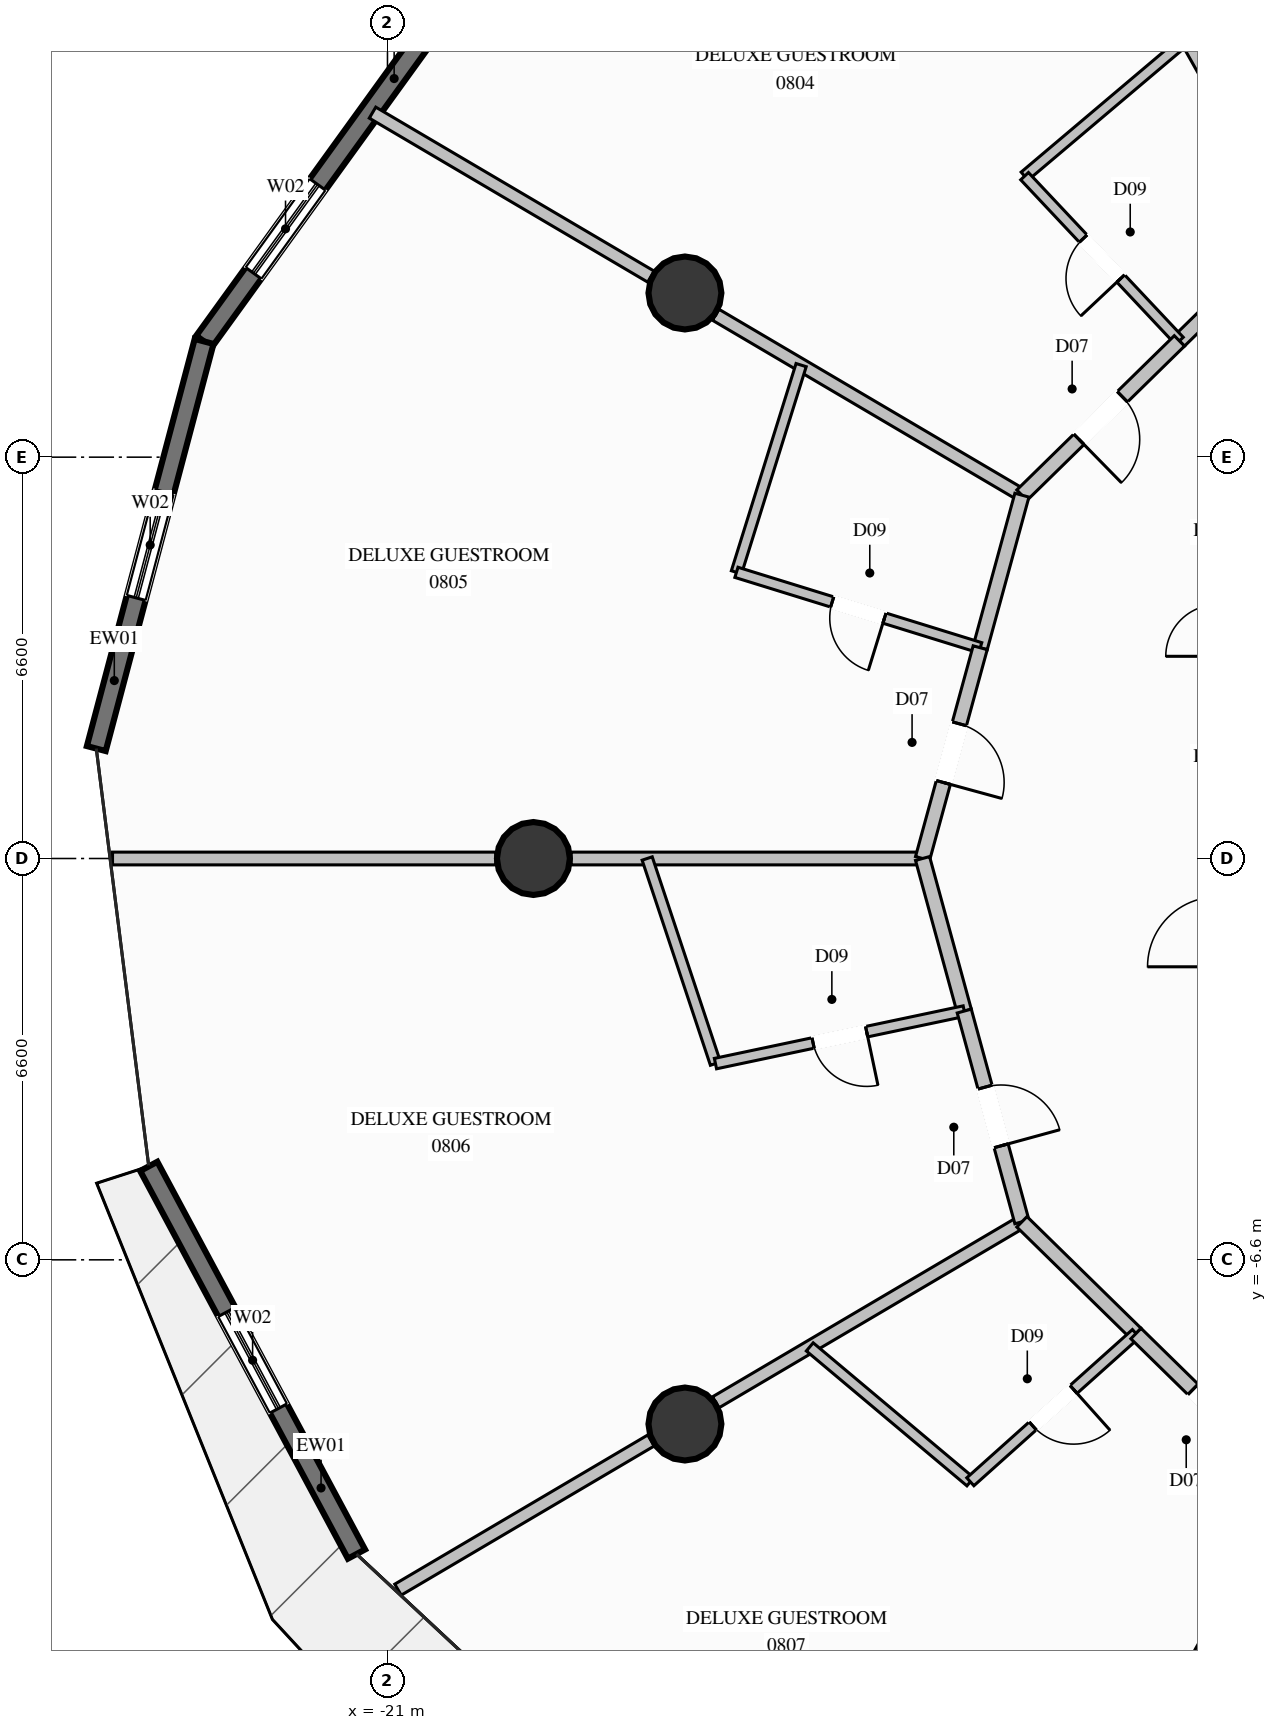
"""IFC4 building model, lengths in metres.
Left out: names, types, materials, properties, quantities, classifications, styles, units other than length and angle.
Written with IfcOpenShell. Run it as: python <this file> out.ifc"""

import sys

from ifc_helpers import new_model, si_unit, direction, frame, frame_2d, origin, origin_2d, place, context, subcontext, project, spatial, rectangle, circle, extrude, element, fill, save


model = new_model("IFC4")
c1 = context("Model", 3, precision=1e-05, world=origin(), true_north=direction((0.0, 1.0)))
c2 = subcontext(c1, "Body", "Model", "MODEL_VIEW")
j1 = project(units=[si_unit("LENGTHUNIT", "METRE"), si_unit("PLANEANGLEUNIT", "RADIAN")], contexts=[c1])
p1 = place(None, origin())
s1 = spatial("IfcSite", under=j1, at=p1, CompositionType="ELEMENT")
p2 = place(p1, origin())
s2 = spatial("IfcBuilding", under=s1, at=p2, CompositionType="ELEMENT")
p3 = place(p2, frame((0.0, 0.0, 32.0)))
s3 = spatial("IfcBuildingStorey", under=s2, at=p3, CompositionType="ELEMENT", Elevation=32.0)
for number, where, z_axis, x_axis in (
    (1, (-16.108, 9.3, 0.0), (0.0, 0.0, 1.0), (1.0, 0.0, 0.0)),
    (2, (-18.6, 0.0, 0.0), (0.0, 0.0, 1.0), (1.0, 0.0, 0.0)),
    (3, (-16.108, -9.3, 0.0), (0.0, 0.0, 1.0), (1.0, 0.0, 0.0)),
):
    element("IfcColumn", number, at=place(p3, frame(where, z_axis=z_axis, x_axis=x_axis)), inside=s3, PredefinedType="COLUMN", context=c2, shape_type="SweptSolid", body=[
        extrude(circle(Radius=0.6, at=origin_2d()), origin(), (0.0, 0.0, 1.0), 3.6),
    ])
p4 = place(p3, frame((-24.016, 8.503, 0.0), z_axis=(0.0, 0.0, 1.0), x_axis=(0.585883584877, 0.810395227634, 0.0)))
e4 = element("IfcWall", 4, at=p4, inside=s3, PredefinedType="SOLIDWALL", context=c2, shape_type="SweptSolid", body=[
    extrude(rectangle(XDim=7.234, YDim=0.32, at=frame_2d((3.617, 0.0))), origin(), (0.0, 0.0, 1.0), 3.34),
])
p5 = place(p4, frame((1.386, 0.0, 0.35)))
e5 = element("IfcOpeningElement", 5, at=p5, cuts=e4, PredefinedType="OPENING", context=c2, shape_type="SweptSolid", body=[
    extrude(rectangle(XDim=1.8, YDim=2.6, at=frame_2d((0.9, 1.3))), frame((0.0, 0.17, 0.0), z_axis=(0.0, -1.0, 0.0), x_axis=(1.0, 0.0, 0.0)), (0.0, 0.0, 1.0), 0.34),
])
p6 = place(p3, frame((-25.789, 1.808, 0.0), z_axis=(0.0, 0.0, 1.0), x_axis=(0.255999140835, 0.966677009084, 0.0)))
e6 = element("IfcWall", 6, at=p6, inside=s3, PredefinedType="SOLIDWALL", context=c2, shape_type="SweptSolid", body=[
    extrude(rectangle(XDim=6.926, YDim=0.32, at=frame_2d((3.463, 0.0))), origin(), (0.0, 0.0, 1.0), 3.34),
])
p7 = place(p6, frame((2.563, 0.0, 0.35)))
e7 = element("IfcOpeningElement", 7, at=p7, cuts=e6, PredefinedType="OPENING", context=c2, shape_type="SweptSolid", body=[
    extrude(rectangle(XDim=1.8, YDim=2.6, at=frame_2d((0.9, 1.3))), frame((0.0, 0.17, 0.0), z_axis=(0.0, -1.0, 0.0), x_axis=(1.0, 0.0, 0.0)), (0.0, 0.0, 1.0), 0.34),
])
p8 = place(p3, frame((-21.51, -11.439, 0.0), z_axis=(0.0, 0.0, 1.0), x_axis=(-0.472255130515, 0.881461905985, 0.0)))
e8 = element("IfcWall", 8, at=p8, inside=s3, PredefinedType="SOLIDWALL", context=c2, shape_type="SweptSolid", body=[
    extrude(rectangle(XDim=7.233, YDim=0.32, at=frame_2d((3.617, 0.0))), origin(), (0.0, 0.0, 1.0), 3.34),
])
p9 = place(p8, frame((2.717, 0.0, 0.35)))
e9 = element("IfcOpeningElement", 9, at=p9, cuts=e8, PredefinedType="OPENING", context=c2, shape_type="SweptSolid", body=[
    extrude(rectangle(XDim=1.8, YDim=2.6, at=frame_2d((0.9, 1.3))), frame((0.0, 0.17, 0.0), z_axis=(0.0, -1.0, 0.0), x_axis=(1.0, 0.0, 0.0)), (0.0, 0.0, 1.0), 0.34),
])
p10 = place(p3, frame((-6.1, 10.349, 0.0), z_axis=(0.0, 0.0, 1.0), x_axis=(-0.491140594116, 0.871080315936, 0.0)))
e10 = element("IfcWall", 10, at=p10, inside=s3, PredefinedType="PARTITIONING", context=c2, shape_type="SweptSolid", body=[
    extrude(rectangle(XDim=5.969, YDim=0.21, at=frame_2d((2.985, 0.0))), origin(), (0.0, 0.0, 1.0), 2.709),
])
p11 = place(p3, frame((-10.566, 5.975, 0.0), z_axis=(0.0, 0.0, 1.0), x_axis=(-0.86160761681, 0.507574935014, 0.0)))
e11 = element("IfcWall", 11, at=p11, inside=s3, PredefinedType="PARTITIONING", context=c2, shape_type="SweptSolid", body=[
    extrude(rectangle(XDim=5.845, YDim=0.21, at=frame_2d((2.922, 0.0))), origin(), (0.0, 0.0, 1.0), 2.709),
])
p12 = place(p3, frame((-16.667, 9.569, 0.0), z_axis=(0.0, 0.0, 1.0), x_axis=(-0.861651827739, 0.50749987956, 0.0)))
e12 = element("IfcWall", 12, at=p12, inside=s3, PredefinedType="PARTITIONING", context=c2, shape_type="SweptSolid", body=[
    extrude(rectangle(XDim=5.314, YDim=0.21, at=frame_2d((2.657, 0.0))), origin(), (0.0, 0.0, 1.0), 3.34),
])
p13 = place(p3, frame((-12.2, 0.0, 0.0), z_axis=(0.0, 0.0, 1.0), x_axis=(-1.0, 0.0, 0.0)))
e13 = element("IfcWall", 13, at=p13, inside=s3, PredefinedType="PARTITIONING", context=c2, shape_type="SweptSolid", body=[
    extrude(rectangle(XDim=5.78, YDim=0.21, at=frame_2d((2.89, 0.0))), origin(), (0.0, 0.0, 1.0), 2.709),
])
p14 = place(p3, frame((-19.22, 0.0, 0.0), z_axis=(0.0, 0.0, 1.0), x_axis=(-1.0, 0.0, 0.0)))
e14 = element("IfcWall", 14, at=p14, inside=s3, PredefinedType="PARTITIONING", context=c2, shape_type="SweptSolid", body=[
    extrude(rectangle(XDim=6.302, YDim=0.21, at=frame_2d((3.151, 0.0))), origin(), (0.0, 0.0, 1.0), 3.34),
])
p15 = place(p3, frame((-10.566, -5.975, 0.0), z_axis=(0.0, 0.0, 1.0), x_axis=(-0.861473203585, -0.507803032194, 0.0)))
e15 = element("IfcWall", 15, at=p15, inside=s3, PredefinedType="PARTITIONING", context=c2, shape_type="SweptSolid", body=[
    extrude(rectangle(XDim=5.845, YDim=0.21, at=frame_2d((2.922, 0.0))), origin(), (0.0, 0.0, 1.0), 2.709),
])
p16 = place(p3, frame((-16.666, -9.571, 0.0), z_axis=(0.0, 0.0, 1.0), x_axis=(-0.861454358035, -0.50783500177, 0.0)))
e16 = element("IfcWall", 16, at=p16, inside=s3, PredefinedType="PARTITIONING", context=c2, shape_type="SweptSolid", body=[
    extrude(rectangle(XDim=4.83, YDim=0.21, at=frame_2d((2.415, 0.0))), origin(), (0.0, 0.0, 1.0), 3.34),
])
p17 = place(p3, frame((-6.1, -10.349, 0.0), z_axis=(0.0, 0.0, 1.0), x_axis=(-0.490503945764, -0.871438970433, 0.0)))
e17 = element("IfcWall", 17, at=p17, inside=s3, PredefinedType="PARTITIONING", context=c2, shape_type="SweptSolid", body=[
    extrude(rectangle(XDim=5.969, YDim=0.21, at=frame_2d((2.985, 0.0))), origin(), (0.0, 0.0, 1.0), 2.709),
])
p18 = place(p3, frame((-6.1, 10.349, 0.0), z_axis=(0.0, 0.0, 1.0), x_axis=(-0.714460071513, -0.69967621527, 0.0)))
e18 = element("IfcWall", 18, at=p18, inside=s3, PredefinedType="PARTITIONING", context=c2, shape_type="SweptSolid", body=[
    extrude(rectangle(XDim=2.626, YDim=0.24, at=frame_2d((1.313, 0.0))), origin(), (0.0, 0.0, 1.0), 3.34),
])
p19 = place(p3, frame((-7.86, 13.471, 0.0), z_axis=(0.0, 0.0, 1.0), x_axis=(-0.763718302061, -0.645549653471, 0.0)))
e19 = element("IfcWall", 19, at=p19, inside=s3, PredefinedType="PLUMBINGWALL", context=c2, shape_type="SweptSolid", body=[
    extrude(rectangle(XDim=3.485, YDim=0.175, at=frame_2d((1.743, 0.0))), origin(), (0.0, 0.0, 1.0), 3.34),
])
p20 = place(p3, frame((-7.976, 8.512, 0.0), z_axis=(0.0, 0.0, 1.0), x_axis=(-0.684831906404, 0.72870107724, 0.0)))
e20 = element("IfcWall", 20, at=p20, inside=s3, PredefinedType="PLUMBINGWALL", context=c2, shape_type="SweptSolid", body=[
    extrude(rectangle(XDim=3.718, YDim=0.175, at=frame_2d((1.859, 0.0))), origin(), (0.0, 0.0, 1.0), 3.34),
])
p21 = place(p20, frame((1.409, 0.0, 0.0)))
e21 = element("IfcOpeningElement", 21, at=p21, cuts=e20, PredefinedType="OPENING", context=c2, shape_type="SweptSolid", body=[
    extrude(rectangle(XDim=0.9, YDim=2.1, at=frame_2d((0.45, 1.05))), frame((0.0, 0.098, 0.0), z_axis=(0.0, -1.0, 0.0), x_axis=(1.0, 0.0, 0.0)), (0.0, 0.0, 1.0), 0.195),
])
p22 = place(p3, frame((-7.976, 8.512, 0.0), z_axis=(0.0, 0.0, 1.0), x_axis=(-0.714375756875, -0.699762301064, 0.0)))
e22 = element("IfcWall", 22, at=p22, inside=s3, PredefinedType="PARTITIONING", context=c2, shape_type="SweptSolid", body=[
    extrude(rectangle(XDim=3.625, YDim=0.24, at=frame_2d((1.812, 0.0))), origin(), (0.0, 0.0, 1.0), 3.34),
])
p23 = place(p22, frame((1.313, 0.0, 0.0)))
e23 = element("IfcOpeningElement", 23, at=p23, cuts=e22, PredefinedType="OPENING", context=c2, shape_type="SweptSolid", body=[
    extrude(rectangle(XDim=1.0, YDim=2.2, at=frame_2d((0.5, 1.1))), frame((0.0, 0.13, 0.0), z_axis=(0.0, -1.0, 0.0), x_axis=(1.0, 0.0, 0.0)), (0.0, 0.0, 1.0), 0.26),
])
p24 = place(p3, frame((-10.566, 5.975, 0.0), z_axis=(0.0, 0.0, 1.0), x_axis=(-0.263744763784, -0.964592504416, 0.0)))
e24 = element("IfcWall", 24, at=p24, inside=s3, PredefinedType="PARTITIONING", context=c2, shape_type="SweptSolid", body=[
    extrude(rectangle(XDim=2.601, YDim=0.24, at=frame_2d((1.301, 0.0))), origin(), (0.0, 0.0, 1.0), 3.34),
])
p25 = place(p3, frame((-14.197, 8.114, 0.0), z_axis=(0.0, 0.0, 1.0), x_axis=(-0.298014103634, -0.954561466871, 0.0)))
e25 = element("IfcWall", 25, at=p25, inside=s3, PredefinedType="PLUMBINGWALL", context=c2, shape_type="SweptSolid", body=[
    extrude(rectangle(XDim=3.57, YDim=0.175, at=frame_2d((1.785, 0.0))), origin(), (0.0, 0.0, 1.0), 3.34),
])
p26 = place(p3, frame((-11.252, 3.466, 0.0), z_axis=(0.0, 0.0, 1.0), x_axis=(-0.955346516927, 0.295487787557, 0.0)))
e26 = element("IfcWall", 26, at=p26, inside=s3, PredefinedType="PLUMBINGWALL", context=c2, shape_type="SweptSolid", body=[
    extrude(rectangle(XDim=4.197, YDim=0.175, at=frame_2d((2.098, 0.0))), origin(), (0.0, 0.0, 1.0), 3.34),
])
p27 = place(p26, frame((1.648, 0.0, 0.0)))
e27 = element("IfcOpeningElement", 27, at=p27, cuts=e26, PredefinedType="OPENING", context=c2, shape_type="SweptSolid", body=[
    extrude(rectangle(XDim=0.9, YDim=2.1, at=frame_2d((0.45, 1.05))), frame((0.0, 0.098, 0.0), z_axis=(0.0, -1.0, 0.0), x_axis=(1.0, 0.0, 0.0)), (0.0, 0.0, 1.0), 0.195),
])
p28 = place(p3, frame((-11.252, 3.466, 0.0), z_axis=(0.0, 0.0, 1.0), x_axis=(-0.263818706543, -0.96457228349, 0.0)))
e28 = element("IfcWall", 28, at=p28, inside=s3, PredefinedType="PARTITIONING", context=c2, shape_type="SweptSolid", body=[
    extrude(rectangle(XDim=3.593, YDim=0.24, at=frame_2d((1.797, 0.0))), origin(), (0.0, 0.0, 1.0), 3.34),
])
p29 = place(p28, frame((1.297, 0.0, 0.0)))
e29 = element("IfcOpeningElement", 29, at=p29, cuts=e28, PredefinedType="OPENING", context=c2, shape_type="SweptSolid", body=[
    extrude(rectangle(XDim=1.0, YDim=2.2, at=frame_2d((0.5, 1.1))), frame((0.0, 0.13, 0.0), z_axis=(0.0, -1.0, 0.0), x_axis=(1.0, 0.0, 0.0)), (0.0, 0.0, 1.0), 0.26),
])
p30 = place(p3, frame((-12.2, 0.0, 0.0), z_axis=(0.0, 0.0, 1.0), x_axis=(0.263744763784, -0.964592504416, 0.0)))
e30 = element("IfcWall", 30, at=p30, inside=s3, PredefinedType="PARTITIONING", context=c2, shape_type="SweptSolid", body=[
    extrude(rectangle(XDim=2.601, YDim=0.24, at=frame_2d((1.301, 0.0))), origin(), (0.0, 0.0, 1.0), 3.34),
])
p31 = place(p3, frame((-16.729, 0.0, 0.0), z_axis=(0.0, 0.0, 1.0), x_axis=(0.315898114113, -0.948793118388, 0.0)))
e31 = element("IfcWall", 31, at=p31, inside=s3, PredefinedType="PLUMBINGWALL", context=c2, shape_type="SweptSolid", body=[
    extrude(rectangle(XDim=3.555, YDim=0.175, at=frame_2d((1.778, 0.0))), origin(), (0.0, 0.0, 1.0), 3.34),
])
p32 = place(p3, frame((-11.514, -2.509, 0.0), z_axis=(0.0, 0.0, 1.0), x_axis=(-0.978427598238, -0.206590016715, 0.0)))
e32 = element("IfcWall", 32, at=p32, inside=s3, PredefinedType="PLUMBINGWALL", context=c2, shape_type="SweptSolid", body=[
    extrude(rectangle(XDim=4.182, YDim=0.175, at=frame_2d((2.091, 0.0))), origin(), (0.0, 0.0, 1.0), 3.34),
])
p33 = place(p32, frame((1.641, 0.0, 0.0)))
e33 = element("IfcOpeningElement", 33, at=p33, cuts=e32, PredefinedType="OPENING", context=c2, shape_type="SweptSolid", body=[
    extrude(rectangle(XDim=0.9, YDim=2.1, at=frame_2d((0.45, 1.05))), frame((0.0, 0.098, 0.0), z_axis=(0.0, -1.0, 0.0), x_axis=(1.0, 0.0, 0.0)), (0.0, 0.0, 1.0), 0.195),
])
p34 = place(p3, frame((-11.514, -2.509, 0.0), z_axis=(0.0, 0.0, 1.0), x_axis=(0.263818706543, -0.96457228349, 0.0)))
e34 = element("IfcWall", 34, at=p34, inside=s3, PredefinedType="PARTITIONING", context=c2, shape_type="SweptSolid", body=[
    extrude(rectangle(XDim=3.593, YDim=0.24, at=frame_2d((1.797, 0.0))), origin(), (0.0, 0.0, 1.0), 3.34),
])
p35 = place(p34, frame((1.297, 0.0, 0.0)))
e35 = element("IfcOpeningElement", 35, at=p35, cuts=e34, PredefinedType="OPENING", context=c2, shape_type="SweptSolid", body=[
    extrude(rectangle(XDim=1.0, YDim=2.2, at=frame_2d((0.5, 1.1))), frame((0.0, 0.13, 0.0), z_axis=(0.0, -1.0, 0.0), x_axis=(1.0, 0.0, 0.0)), (0.0, 0.0, 1.0), 0.26),
])
p36 = place(p3, frame((-10.566, -5.975, 0.0), z_axis=(0.0, 0.0, 1.0), x_axis=(0.714506552913, -0.699628748584, 0.0)))
e36 = element("IfcWall", 36, at=p36, inside=s3, PredefinedType="PARTITIONING", context=c2, shape_type="SweptSolid", body=[
    extrude(rectangle(XDim=2.625, YDim=0.24, at=frame_2d((1.313, 0.0))), origin(), (0.0, 0.0, 1.0), 3.34),
])
p37 = place(p3, frame((-14.055, -8.032, 0.0), z_axis=(0.0, 0.0, 1.0), x_axis=(0.765749489357, -0.643138958196, 0.0)))
e37 = element("IfcWall", 37, at=p37, inside=s3, PredefinedType="PLUMBINGWALL", context=c2, shape_type="SweptSolid", body=[
    extrude(rectangle(XDim=3.449, YDim=0.175, at=frame_2d((1.724, 0.0))), origin(), (0.0, 0.0, 1.0), 3.34),
])
p38 = place(p3, frame((-8.69, -7.812, 0.0), z_axis=(0.0, 0.0, 1.0), x_axis=(-0.745157470099, -0.666888554975, 0.0)))
e38 = element("IfcWall", 38, at=p38, inside=s3, PredefinedType="PLUMBINGWALL", context=c2, shape_type="SweptSolid", body=[
    extrude(rectangle(XDim=3.656, YDim=0.175, at=frame_2d((1.828, 0.0))), origin(), (0.0, 0.0, 1.0), 3.34),
])
p39 = place(p38, frame((1.378, 0.0, 0.0)))
e39 = element("IfcOpeningElement", 39, at=p39, cuts=e38, PredefinedType="OPENING", context=c2, shape_type="SweptSolid", body=[
    extrude(rectangle(XDim=0.9, YDim=2.1, at=frame_2d((0.45, 1.05))), frame((0.0, 0.098, 0.0), z_axis=(0.0, -1.0, 0.0), x_axis=(1.0, 0.0, 0.0)), (0.0, 0.0, 1.0), 0.195),
])
p40 = place(p3, frame((-8.69, -7.812, 0.0), z_axis=(0.0, 0.0, 1.0), x_axis=(0.714342093268, -0.699796666029, 0.0)))
e40 = element("IfcWall", 40, at=p40, inside=s3, PredefinedType="PARTITIONING", context=c2, shape_type="SweptSolid", body=[
    extrude(rectangle(XDim=3.625, YDim=0.24, at=frame_2d((1.813, 0.0))), origin(), (0.0, 0.0, 1.0), 3.34),
])
p41 = place(p40, frame((1.313, 0.0, 0.0)))
e41 = element("IfcOpeningElement", 41, at=p41, cuts=e40, PredefinedType="OPENING", context=c2, shape_type="SweptSolid", body=[
    extrude(rectangle(XDim=1.0, YDim=2.2, at=frame_2d((0.5, 1.1))), frame((0.0, 0.13, 0.0), z_axis=(0.0, -1.0, 0.0), x_axis=(1.0, 0.0, 0.0)), (0.0, 0.0, 1.0), 0.26),
])
p42 = place(p5, origin())
e42 = element("IfcWindow", 42, at=p42, inside=s3, PartitioningType="SINGLE_PANEL", PredefinedType="WINDOW", context=c2, shape_type="SweptSolid", body=[
    extrude(rectangle(XDim=1.8, YDim=2.6, at=frame_2d((0.9, 1.3))), frame((0.0, 0.03, 0.0), z_axis=(0.0, -1.0, 0.0), x_axis=(1.0, 0.0, 0.0)), (0.0, 0.0, 1.0), 0.06),
])
fill(e5, e42)
p43 = place(p7, origin())
e43 = element("IfcWindow", 43, at=p43, inside=s3, PartitioningType="SINGLE_PANEL", PredefinedType="WINDOW", context=c2, shape_type="SweptSolid", body=[
    extrude(rectangle(XDim=1.8, YDim=2.6, at=frame_2d((0.9, 1.3))), frame((0.0, 0.03, 0.0), z_axis=(0.0, -1.0, 0.0), x_axis=(1.0, 0.0, 0.0)), (0.0, 0.0, 1.0), 0.06),
])
fill(e7, e43)
p44 = place(p9, origin())
e44 = element("IfcWindow", 44, at=p44, inside=s3, PartitioningType="SINGLE_PANEL", PredefinedType="WINDOW", context=c2, shape_type="SweptSolid", body=[
    extrude(rectangle(XDim=1.8, YDim=2.6, at=frame_2d((0.9, 1.3))), frame((0.0, 0.03, 0.0), z_axis=(0.0, -1.0, 0.0), x_axis=(1.0, 0.0, 0.0)), (0.0, 0.0, 1.0), 0.06),
])
fill(e9, e44)
p45 = place(p21, origin())
e45 = element("IfcDoor", 45, at=p45, inside=s3, OperationType="SINGLE_SWING_LEFT", PredefinedType="DOOR", context=c2, shape_type="SweptSolid", body=[
    extrude(rectangle(XDim=0.9, YDim=2.1, at=frame_2d((0.45, 1.05))), frame((0.0, 0.025, 0.0), z_axis=(0.0, -1.0, 0.0), x_axis=(1.0, 0.0, 0.0)), (0.0, 0.0, 1.0), 0.05),
])
fill(e21, e45)
p46 = place(p23, origin())
e46 = element("IfcDoor", 46, at=p46, inside=s3, OperationType="SINGLE_SWING_RIGHT", PredefinedType="DOOR", context=c2, shape_type="SweptSolid", body=[
    extrude(rectangle(XDim=1.0, YDim=2.2, at=frame_2d((0.5, 1.1))), frame((0.0, 0.025, 0.0), z_axis=(0.0, -1.0, 0.0), x_axis=(1.0, 0.0, 0.0)), (0.0, 0.0, 1.0), 0.05),
])
fill(e23, e46)
p47 = place(p27, origin())
e47 = element("IfcDoor", 47, at=p47, inside=s3, OperationType="SINGLE_SWING_LEFT", PredefinedType="DOOR", context=c2, shape_type="SweptSolid", body=[
    extrude(rectangle(XDim=0.9, YDim=2.1, at=frame_2d((0.45, 1.05))), frame((0.0, 0.025, 0.0), z_axis=(0.0, -1.0, 0.0), x_axis=(1.0, 0.0, 0.0)), (0.0, 0.0, 1.0), 0.05),
])
fill(e27, e47)
p48 = place(p29, origin())
e48 = element("IfcDoor", 48, at=p48, inside=s3, OperationType="SINGLE_SWING_RIGHT", PredefinedType="DOOR", context=c2, shape_type="SweptSolid", body=[
    extrude(rectangle(XDim=1.0, YDim=2.2, at=frame_2d((0.5, 1.1))), frame((0.0, 0.025, 0.0), z_axis=(0.0, -1.0, 0.0), x_axis=(1.0, 0.0, 0.0)), (0.0, 0.0, 1.0), 0.05),
])
fill(e29, e48)
p49 = place(p33, origin())
e49 = element("IfcDoor", 49, at=p49, inside=s3, OperationType="SINGLE_SWING_LEFT", PredefinedType="DOOR", context=c2, shape_type="SweptSolid", body=[
    extrude(rectangle(XDim=0.9, YDim=2.1, at=frame_2d((0.45, 1.05))), frame((0.0, 0.025, 0.0), z_axis=(0.0, -1.0, 0.0), x_axis=(1.0, 0.0, 0.0)), (0.0, 0.0, 1.0), 0.05),
])
fill(e33, e49)
p50 = place(p35, origin())
e50 = element("IfcDoor", 50, at=p50, inside=s3, OperationType="SINGLE_SWING_RIGHT", PredefinedType="DOOR", context=c2, shape_type="SweptSolid", body=[
    extrude(rectangle(XDim=1.0, YDim=2.2, at=frame_2d((0.5, 1.1))), frame((0.0, 0.025, 0.0), z_axis=(0.0, -1.0, 0.0), x_axis=(1.0, 0.0, 0.0)), (0.0, 0.0, 1.0), 0.05),
])
fill(e35, e50)
p51 = place(p39, origin())
e51 = element("IfcDoor", 51, at=p51, inside=s3, OperationType="SINGLE_SWING_LEFT", PredefinedType="DOOR", context=c2, shape_type="SweptSolid", body=[
    extrude(rectangle(XDim=0.9, YDim=2.1, at=frame_2d((0.45, 1.05))), frame((0.0, 0.025, 0.0), z_axis=(0.0, -1.0, 0.0), x_axis=(1.0, 0.0, 0.0)), (0.0, 0.0, 1.0), 0.05),
])
fill(e39, e51)
p52 = place(p41, origin())
e52 = element("IfcDoor", 52, at=p52, inside=s3, OperationType="SINGLE_SWING_RIGHT", PredefinedType="DOOR", context=c2, shape_type="SweptSolid", body=[
    extrude(rectangle(XDim=1.0, YDim=2.2, at=frame_2d((0.5, 1.1))), frame((0.0, 0.025, 0.0), z_axis=(0.0, -1.0, 0.0), x_axis=(1.0, 0.0, 0.0)), (0.0, 0.0, 1.0), 0.05),
])
fill(e41, e52)
save(model, sys.argv[1])
